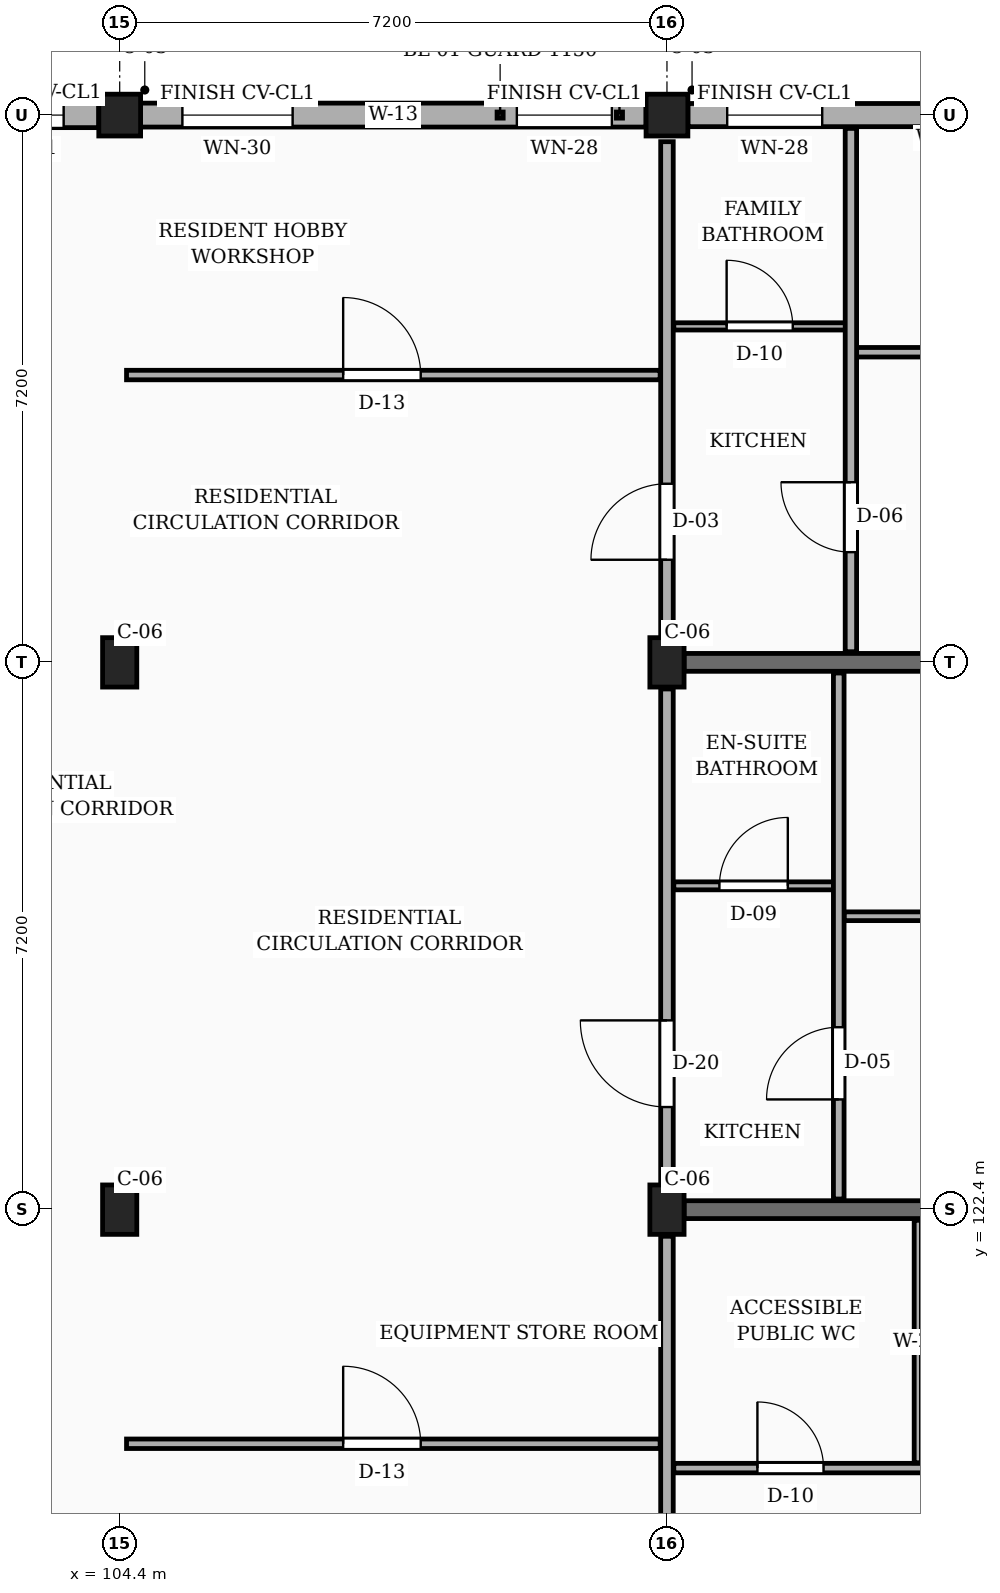
"""IFC4 building model, lengths in metres.
Left out: names, types, materials, properties, quantities, classifications, styles, units other than length and angle.
Written with IfcOpenShell. Run it as: python <this file> out.ifc"""

import sys

from ifc_helpers import new_model, si_unit, direction, frame, frame_2d, origin, origin_2d, place, context, subcontext, project, spatial, rectangle, extrude, element, fill, save


model = new_model("IFC4")
c1 = context("Model", 3, precision=1e-05, world=origin(), true_north=direction((0.0, 1.0)))
c2 = subcontext(c1, "Body", "Model", "MODEL_VIEW")
j1 = project(units=[si_unit("LENGTHUNIT", "METRE"), si_unit("PLANEANGLEUNIT", "RADIAN")], contexts=[c1])
p1 = place(None, origin())
s1 = spatial("IfcSite", under=j1, at=p1, CompositionType="ELEMENT")
p2 = place(p1, origin())
s2 = spatial("IfcBuilding", under=s1, at=p2, CompositionType="ELEMENT")
p3 = place(p2, frame((0.0, 0.0, 20.25)))
s3 = spatial("IfcBuildingStorey", under=s2, at=p3, CompositionType="ELEMENT", Elevation=20.25)
for number, where, z_axis, x_axis in (
    (1, (104.4, 122.4, 0.0), (0.0, 0.0, 1.0), (1.0, 0.0, 0.0)),
    (2, (104.4, 129.6, 0.0), (0.0, 0.0, 1.0), (1.0, 0.0, 0.0)),
):
    element("IfcColumn", number, at=place(p3, frame(where, z_axis=z_axis, x_axis=x_axis)), inside=s3, PredefinedType="COLUMN", context=c2, shape_type="SweptSolid", body=[
        extrude(rectangle(XDim=0.45, YDim=0.65, at=origin_2d()), origin(), (0.0, 0.0, 1.0), 3.15),
    ])
p4 = place(p3, frame((104.4, 136.8, 0.0), z_axis=(0.0, 0.0, 1.0), x_axis=(1.0, 0.0, 0.0)))
e3 = element("IfcColumn", 3, at=p4, inside=s3, PredefinedType="COLUMN", context=c2, shape_type="SweptSolid", body=[
    extrude(rectangle(XDim=0.55, YDim=0.55, at=origin_2d()), origin(), (0.0, 0.0, 1.0), 3.15),
])
for number, where, z_axis, x_axis in (
    (4, (111.6, 122.4, 0.0), (0.0, 0.0, 1.0), (1.0, 0.0, 0.0)),
    (5, (111.6, 129.6, 0.0), (0.0, 0.0, 1.0), (1.0, 0.0, 0.0)),
):
    element("IfcColumn", number, at=place(p3, frame(where, z_axis=z_axis, x_axis=x_axis)), inside=s3, PredefinedType="COLUMN", context=c2, shape_type="SweptSolid", body=[
        extrude(rectangle(XDim=0.45, YDim=0.65, at=origin_2d()), origin(), (0.0, 0.0, 1.0), 3.15),
    ])
p5 = place(p3, frame((111.6, 136.8, 0.0), z_axis=(0.0, 0.0, 1.0), x_axis=(1.0, 0.0, 0.0)))
e6 = element("IfcColumn", 6, at=p5, inside=s3, PredefinedType="COLUMN", context=c2, shape_type="SweptSolid", body=[
    extrude(rectangle(XDim=0.55, YDim=0.55, at=origin_2d()), origin(), (0.0, 0.0, 1.0), 3.15),
])
for number, where, z_axis, x_axis in (
    (7, (111.825, 122.4, 0.0), (0.0, 0.0, 1.0), (1.0, 0.0, 0.0)),
    (8, (111.825, 129.6, 0.0), (0.0, 0.0, 1.0), (1.0, 0.0, 0.0)),
):
    element("IfcWall", number, at=place(p3, frame(where, z_axis=z_axis, x_axis=x_axis)), inside=s3, PredefinedType="SOLIDWALL", context=c2, shape_type="SweptSolid", body=[
        extrude(rectangle(XDim=6.7, YDim=0.235, at=frame_2d((3.35, 0.0))), origin(), (0.0, 0.0, 1.0), 2.19),
    ])
p6 = place(p3, frame((118.525, 136.8, 0.0), z_axis=(0.0, 0.0, 1.0), x_axis=(-1.0, 0.0, 0.0)))
e9 = element("IfcWall", 9, at=p6, inside=s3, PredefinedType="SOLIDWALL", context=c2, shape_type="SweptSolid", body=[
    extrude(rectangle(XDim=6.65, YDim=0.305, at=frame_2d((3.325, 0.0))), origin(), (0.0, 0.0, 1.0), 2.46),
])
p7 = place(p6, frame((1.798, 0.0, 0.78)))
e10 = element("IfcOpeningElement", 10, at=p7, cuts=e9, PredefinedType="OPENING", context=c2, shape_type="SweptSolid", body=[
    extrude(rectangle(XDim=1.05, YDim=1.44, at=frame_2d((0.525, 0.72))), frame((0.0, 0.163, 0.0), z_axis=(0.0, -1.0, 0.0), x_axis=(1.0, 0.0, 0.0)), (0.0, 0.0, 1.0), 0.325),
])
p8 = place(p6, frame((4.883, 0.0, 0.78)))
e11 = element("IfcOpeningElement", 11, at=p8, cuts=e9, PredefinedType="OPENING", context=c2, shape_type="SweptSolid", body=[
    extrude(rectangle(XDim=1.25, YDim=1.44, at=frame_2d((0.625, 0.72))), frame((0.0, 0.163, 0.0), z_axis=(0.0, -1.0, 0.0), x_axis=(1.0, 0.0, 0.0)), (0.0, 0.0, 1.0), 0.325),
])
p9 = place(p3, frame((111.325, 136.8, 0.0), z_axis=(0.0, 0.0, 1.0), x_axis=(-1.0, 0.0, 0.0)))
e12 = element("IfcWall", 12, at=p9, inside=s3, PredefinedType="SOLIDWALL", context=c2, shape_type="SweptSolid", body=[
    extrude(rectangle(XDim=6.65, YDim=0.315, at=frame_2d((3.325, 0.0))), origin(), (0.0, 0.0, 1.0), 2.46),
])
p10 = place(p9, frame((0.45, 0.0, 0.78)))
e13 = element("IfcOpeningElement", 13, at=p10, cuts=e12, PredefinedType="OPENING", context=c2, shape_type="SweptSolid", body=[
    extrude(rectangle(XDim=1.25, YDim=1.44, at=frame_2d((0.625, 0.72))), frame((0.0, 0.167, 0.0), z_axis=(0.0, -1.0, 0.0), x_axis=(1.0, 0.0, 0.0)), (0.0, 0.0, 1.0), 0.335),
])
p11 = place(p9, frame((4.65, 0.0, 0.78)))
e14 = element("IfcOpeningElement", 14, at=p11, cuts=e12, PredefinedType="OPENING", context=c2, shape_type="SweptSolid", body=[
    extrude(rectangle(XDim=1.45, YDim=1.44, at=frame_2d((0.725, 0.72))), frame((0.0, 0.167, 0.0), z_axis=(0.0, -1.0, 0.0), x_axis=(1.0, 0.0, 0.0)), (0.0, 0.0, 1.0), 0.335),
])
p12 = place(p3, frame((104.125, 136.8, 0.0), z_axis=(0.0, 0.0, 1.0), x_axis=(-1.0, 0.0, 0.0)))
e15 = element("IfcWall", 15, at=p12, inside=s3, PredefinedType="SOLIDWALL", context=c2, shape_type="SweptSolid", body=[
    extrude(rectangle(XDim=6.65, YDim=0.33, at=frame_2d((3.325, 0.0))), origin(), (0.0, 0.0, 1.0), 2.46),
])
p13 = place(p12, frame((0.462, 0.0, 0.78)))
e16 = element("IfcOpeningElement", 16, at=p13, cuts=e15, PredefinedType="OPENING", context=c2, shape_type="SweptSolid", body=[
    extrude(rectangle(XDim=1.04, YDim=1.26, at=frame_2d((0.52, 0.63))), frame((0.0, 0.175, 0.0), z_axis=(0.0, -1.0, 0.0), x_axis=(1.0, 0.0, 0.0)), (0.0, 0.0, 1.0), 0.35),
])
p14 = place(p12, frame((3.005, 0.0, 0.78)))
e17 = element("IfcOpeningElement", 17, at=p14, cuts=e15, PredefinedType="OPENING", context=c2, shape_type="SweptSolid", body=[
    extrude(rectangle(XDim=0.92, YDim=1.15, at=frame_2d((0.46, 0.575))), frame((0.0, 0.175, 0.0), z_axis=(0.0, -1.0, 0.0), x_axis=(1.0, 0.0, 0.0)), (0.0, 0.0, 1.0), 0.35),
])
p15 = place(p12, frame((5.383, 0.0, 0.78)))
e18 = element("IfcOpeningElement", 18, at=p15, cuts=e15, PredefinedType="OPENING", context=c2, shape_type="SweptSolid", body=[
    extrude(rectangle(XDim=0.85, YDim=1.15, at=frame_2d((0.425, 0.575))), frame((0.0, 0.175, 0.0), z_axis=(0.0, -1.0, 0.0), x_axis=(1.0, 0.0, 0.0)), (0.0, 0.0, 1.0), 0.35),
])
p16 = place(p3, frame((111.6, 115.55, 0.0), z_axis=(0.0, 0.0, 1.0), x_axis=(0.0, 1.0, 0.0)))
e19 = element("IfcWall", 19, at=p16, inside=s3, PredefinedType="PARTITIONING", context=c2, shape_type="SweptSolid", body=[
    extrude(rectangle(XDim=6.5, YDim=0.165, at=frame_2d((3.25, 0.0))), origin(), (0.0, 0.0, 1.0), 2.325),
])
p17 = place(p16, frame((1.1, 0.0, 0.0)))
e20 = element("IfcOpeningElement", 20, at=p17, cuts=e19, PredefinedType="OPENING", context=c2, shape_type="SweptSolid", body=[
    extrude(rectangle(XDim=0.94, YDim=2.12, at=frame_2d((0.47, 1.06))), frame((0.0, 0.093, 0.0), z_axis=(0.0, -1.0, 0.0), x_axis=(1.0, 0.0, 0.0)), (0.0, 0.0, 1.0), 0.185),
])
p18 = place(p3, frame((111.6, 122.75, 0.0), z_axis=(0.0, 0.0, 1.0), x_axis=(0.0, 1.0, 0.0)))
e21 = element("IfcWall", 21, at=p18, inside=s3, PredefinedType="PARTITIONING", context=c2, shape_type="SweptSolid", body=[
    extrude(rectangle(XDim=6.5, YDim=0.165, at=frame_2d((3.25, 0.0))), origin(), (0.0, 0.0, 1.0), 2.325),
])
p19 = place(p18, frame((1.0, 0.0, 0.0)))
e22 = element("IfcOpeningElement", 22, at=p19, cuts=e21, PredefinedType="OPENING", context=c2, shape_type="SweptSolid", body=[
    extrude(rectangle(XDim=1.14, YDim=2.18, at=frame_2d((0.57, 1.09))), frame((0.0, 0.093, 0.0), z_axis=(0.0, -1.0, 0.0), x_axis=(1.0, 0.0, 0.0)), (0.0, 0.0, 1.0), 0.185),
])
p20 = place(p3, frame((111.6, 129.95, 0.0), z_axis=(0.0, 0.0, 1.0), x_axis=(0.0, 1.0, 0.0)))
e23 = element("IfcWall", 23, at=p20, inside=s3, PredefinedType="PARTITIONING", context=c2, shape_type="SweptSolid", body=[
    extrude(rectangle(XDim=6.5, YDim=0.165, at=frame_2d((3.25, 0.0))), origin(), (0.0, 0.0, 1.0), 2.325),
])
p21 = place(p20, frame((1.0, 0.0, 0.0)))
e24 = element("IfcOpeningElement", 24, at=p21, cuts=e23, PredefinedType="OPENING", context=c2, shape_type="SweptSolid", body=[
    extrude(rectangle(XDim=1.0, YDim=2.15, at=frame_2d((0.5, 1.075))), frame((0.0, 0.093, 0.0), z_axis=(0.0, -1.0, 0.0), x_axis=(1.0, 0.0, 0.0)), (0.0, 0.0, 1.0), 0.185),
])
p22 = place(p3, frame((104.49, 119.32, 0.0), z_axis=(0.0, 0.0, 1.0), x_axis=(1.0, 0.0, 0.0)))
e25 = element("IfcWall", 25, at=p22, inside=s3, PredefinedType="PARTITIONING", context=c2, shape_type="SweptSolid", body=[
    extrude(rectangle(XDim=7.02, YDim=0.125, at=frame_2d((3.51, 0.0))), origin(), (0.0, 0.0, 1.0), 2.325),
])
p23 = place(p22, frame((2.85, 0.0, 0.0)))
e26 = element("IfcOpeningElement", 26, at=p23, cuts=e25, PredefinedType="OPENING", context=c2, shape_type="SweptSolid", body=[
    extrude(rectangle(XDim=1.02, YDim=2.15, at=frame_2d((0.51, 1.075))), frame((0.0, 0.073, 0.0), z_axis=(0.0, -1.0, 0.0), x_axis=(1.0, 0.0, 0.0)), (0.0, 0.0, 1.0), 0.145),
])
p24 = place(p3, frame((111.69, 119.0, 0.0), z_axis=(0.0, 0.0, 1.0), x_axis=(1.0, 0.0, 0.0)))
e27 = element("IfcWall", 27, at=p24, inside=s3, PredefinedType="PARTITIONING", context=c2, shape_type="SweptSolid", body=[
    extrude(rectangle(XDim=6.935, YDim=0.125, at=frame_2d((3.468, 0.0))), origin(), (0.0, 0.0, 1.0), 2.325),
])
p25 = place(p24, frame((1.1, 0.0, 0.0)))
e28 = element("IfcOpeningElement", 28, at=p25, cuts=e27, PredefinedType="OPENING", context=c2, shape_type="SweptSolid", body=[
    extrude(rectangle(XDim=0.87, YDim=2.05, at=frame_2d((0.435, 1.025))), frame((0.0, 0.073, 0.0), z_axis=(0.0, -1.0, 0.0), x_axis=(1.0, 0.0, 0.0)), (0.0, 0.0, 1.0), 0.145),
])
p26 = place(p24, frame((4.5, 0.0, 0.0)))
e29 = element("IfcOpeningElement", 29, at=p26, cuts=e27, PredefinedType="OPENING", context=c2, shape_type="SweptSolid", body=[
    extrude(rectangle(XDim=0.92, YDim=2.1, at=frame_2d((0.46, 1.05))), frame((0.0, 0.073, 0.0), z_axis=(0.0, -1.0, 0.0), x_axis=(1.0, 0.0, 0.0)), (0.0, 0.0, 1.0), 0.145),
])
p27 = place(p3, frame((114.9, 119.07, 0.0), z_axis=(0.0, 0.0, 1.0), x_axis=(0.0, 1.0, 0.0)))
e30 = element("IfcWall", 30, at=p27, inside=s3, PredefinedType="PARTITIONING", context=c2, shape_type="SweptSolid", body=[
    extrude(rectangle(XDim=3.19, YDim=0.095, at=frame_2d((1.595, 0.0))), origin(), (0.0, 0.0, 1.0), 2.325),
])
p28 = place(p3, frame((113.93, 126.26, 0.0), z_axis=(0.0, 0.0, 1.0), x_axis=(1.0, 0.0, 0.0)))
e31 = element("IfcWall", 31, at=p28, inside=s3, PredefinedType="PARTITIONING", context=c2, shape_type="SweptSolid", body=[
    extrude(rectangle(XDim=4.695, YDim=0.115, at=frame_2d((2.348, 0.0))), origin(), (0.0, 0.0, 1.0), 2.325),
])
p29 = place(p28, frame((1.897, 0.0, 0.0)))
e32 = element("IfcOpeningElement", 32, at=p29, cuts=e31, PredefinedType="OPENING", context=c2, shape_type="SweptSolid", body=[
    extrude(rectangle(XDim=0.9, YDim=2.1, at=frame_2d((0.45, 1.05))), frame((0.0, 0.067, 0.0), z_axis=(0.0, -1.0, 0.0), x_axis=(1.0, 0.0, 0.0)), (0.0, 0.0, 1.0), 0.135),
])
p30 = place(p3, frame((111.69, 126.66, 0.0), z_axis=(0.0, 0.0, 1.0), x_axis=(1.0, 0.0, 0.0)))
e33 = element("IfcWall", 33, at=p30, inside=s3, PredefinedType="PARTITIONING", context=c2, shape_type="SweptSolid", body=[
    extrude(rectangle(XDim=2.1, YDim=0.105, at=frame_2d((1.05, 0.0))), origin(), (0.0, 0.0, 1.0), 2.325),
])
p31 = place(p30, frame((0.6, 0.0, 0.0)))
e34 = element("IfcOpeningElement", 34, at=p31, cuts=e33, PredefinedType="OPENING", context=c2, shape_type="SweptSolid", body=[
    extrude(rectangle(XDim=0.9, YDim=2.05, at=frame_2d((0.45, 1.025))), frame((0.0, 0.062, 0.0), z_axis=(0.0, -1.0, 0.0), x_axis=(1.0, 0.0, 0.0)), (0.0, 0.0, 1.0), 0.125),
])
p32 = place(p3, frame((113.86, 122.54, 0.0), z_axis=(0.0, 0.0, 1.0), x_axis=(0.0, 1.0, 0.0)))
e35 = element("IfcWall", 35, at=p32, inside=s3, PredefinedType="PARTITIONING", context=c2, shape_type="SweptSolid", body=[
    extrude(rectangle(XDim=6.92, YDim=0.14, at=frame_2d((3.46, 0.0))), origin(), (0.0, 0.0, 1.0), 2.325),
])
p33 = place(p32, frame((1.31, 0.0, 0.0)))
e36 = element("IfcOpeningElement", 36, at=p33, cuts=e35, PredefinedType="OPENING", context=c2, shape_type="SweptSolid", body=[
    extrude(rectangle(XDim=0.95, YDim=2.1, at=frame_2d((0.475, 1.05))), frame((0.0, 0.08, 0.0), z_axis=(0.0, -1.0, 0.0), x_axis=(1.0, 0.0, 0.0)), (0.0, 0.0, 1.0), 0.16),
])
p34 = place(p3, frame((104.49, 133.38, 0.0), z_axis=(0.0, 0.0, 1.0), x_axis=(1.0, 0.0, 0.0)))
e37 = element("IfcWall", 37, at=p34, inside=s3, PredefinedType="PARTITIONING", context=c2, shape_type="SweptSolid", body=[
    extrude(rectangle(XDim=7.02, YDim=0.125, at=frame_2d((3.51, 0.0))), origin(), (0.0, 0.0, 1.0), 2.325),
])
p35 = place(p34, frame((2.85, 0.0, 0.0)))
e38 = element("IfcOpeningElement", 38, at=p35, cuts=e37, PredefinedType="OPENING", context=c2, shape_type="SweptSolid", body=[
    extrude(rectangle(XDim=1.02, YDim=2.15, at=frame_2d((0.51, 1.075))), frame((0.0, 0.073, 0.0), z_axis=(0.0, -1.0, 0.0), x_axis=(1.0, 0.0, 0.0)), (0.0, 0.0, 1.0), 0.145),
])
p36 = place(p3, frame((114.09, 133.68, 0.0), z_axis=(0.0, 0.0, 1.0), x_axis=(1.0, 0.0, 0.0)))
e39 = element("IfcWall", 39, at=p36, inside=s3, PredefinedType="PARTITIONING", context=c2, shape_type="SweptSolid", body=[
    extrude(rectangle(XDim=4.535, YDim=0.125, at=frame_2d((2.268, 0.0))), origin(), (0.0, 0.0, 1.0), 2.325),
])
p37 = place(p36, frame((1.827, 0.0, 0.0)))
e40 = element("IfcOpeningElement", 40, at=p37, cuts=e39, PredefinedType="OPENING", context=c2, shape_type="SweptSolid", body=[
    extrude(rectangle(XDim=0.88, YDim=2.08, at=frame_2d((0.44, 1.04))), frame((0.0, 0.073, 0.0), z_axis=(0.0, -1.0, 0.0), x_axis=(1.0, 0.0, 0.0)), (0.0, 0.0, 1.0), 0.145),
])
p38 = place(p3, frame((111.69, 134.02, 0.0), z_axis=(0.0, 0.0, 1.0), x_axis=(1.0, 0.0, 0.0)))
e41 = element("IfcWall", 41, at=p38, inside=s3, PredefinedType="PARTITIONING", context=c2, shape_type="SweptSolid", body=[
    extrude(rectangle(XDim=2.26, YDim=0.095, at=frame_2d((1.13, 0.0))), origin(), (0.0, 0.0, 1.0), 2.325),
])
p39 = place(p38, frame((0.695, 0.0, 0.0)))
e42 = element("IfcOpeningElement", 42, at=p39, cuts=e41, PredefinedType="OPENING", context=c2, shape_type="SweptSolid", body=[
    extrude(rectangle(XDim=0.87, YDim=2.05, at=frame_2d((0.435, 1.025))), frame((0.0, 0.058, 0.0), z_axis=(0.0, -1.0, 0.0), x_axis=(1.0, 0.0, 0.0)), (0.0, 0.0, 1.0), 0.115),
])
p40 = place(p3, frame((114.02, 129.74, 0.0), z_axis=(0.0, 0.0, 1.0), x_axis=(0.0, 1.0, 0.0)))
e43 = element("IfcWall", 43, at=p40, inside=s3, PredefinedType="PARTITIONING", context=c2, shape_type="SweptSolid", body=[
    extrude(rectangle(XDim=6.885, YDim=0.15, at=frame_2d((3.442, 0.0))), origin(), (0.0, 0.0, 1.0), 2.325),
])
p41 = place(p40, frame((1.31, 0.0, 0.0)))
e44 = element("IfcOpeningElement", 44, at=p41, cuts=e43, PredefinedType="OPENING", context=c2, shape_type="SweptSolid", body=[
    extrude(rectangle(XDim=0.92, YDim=2.1, at=frame_2d((0.46, 1.05))), frame((0.0, 0.085, 0.0), z_axis=(0.0, -1.0, 0.0), x_axis=(1.0, 0.0, 0.0)), (0.0, 0.0, 1.0), 0.17),
])
p42 = place(p8, origin())
e45 = element("IfcWindow", 45, at=p42, inside=s3, PartitioningType="SINGLE_PANEL", PredefinedType="WINDOW", context=c2, shape_type="SweptSolid", body=[
    extrude(rectangle(XDim=1.25, YDim=1.44, at=frame_2d((0.625, 0.72))), frame((0.0, 0.03, 0.0), z_axis=(0.0, -1.0, 0.0), x_axis=(1.0, 0.0, 0.0)), (0.0, 0.0, 1.0), 0.06),
])
fill(e11, e45)
p43 = place(p10, origin())
e46 = element("IfcWindow", 46, at=p43, inside=s3, PartitioningType="SINGLE_PANEL", PredefinedType="WINDOW", context=c2, shape_type="SweptSolid", body=[
    extrude(rectangle(XDim=1.25, YDim=1.44, at=frame_2d((0.625, 0.72))), frame((0.0, 0.03, 0.0), z_axis=(0.0, -1.0, 0.0), x_axis=(1.0, 0.0, 0.0)), (0.0, 0.0, 1.0), 0.06),
])
fill(e13, e46)
p44 = place(p11, origin())
e47 = element("IfcWindow", 47, at=p44, inside=s3, PartitioningType="SINGLE_PANEL", PredefinedType="WINDOW", context=c2, shape_type="SweptSolid", body=[
    extrude(rectangle(XDim=1.45, YDim=1.44, at=frame_2d((0.725, 0.72))), frame((0.0, 0.03, 0.0), z_axis=(0.0, -1.0, 0.0), x_axis=(1.0, 0.0, 0.0)), (0.0, 0.0, 1.0), 0.06),
])
fill(e14, e47)
p45 = place(p13, origin())
e48 = element("IfcWindow", 48, at=p45, inside=s3, PartitioningType="SINGLE_PANEL", PredefinedType="WINDOW", context=c2, shape_type="SweptSolid", body=[
    extrude(rectangle(XDim=1.04, YDim=1.26, at=frame_2d((0.52, 0.63))), frame((0.0, 0.03, 0.0), z_axis=(0.0, -1.0, 0.0), x_axis=(1.0, 0.0, 0.0)), (0.0, 0.0, 1.0), 0.06),
])
fill(e16, e48)
p46 = place(p19, origin())
e49 = element("IfcDoor", 49, at=p46, inside=s3, OperationType="SINGLE_SWING_RIGHT", PredefinedType="DOOR", context=c2, shape_type="SweptSolid", body=[
    extrude(rectangle(XDim=1.14, YDim=2.18, at=frame_2d((0.57, 1.09))), frame((0.0, 0.025, 0.0), z_axis=(0.0, -1.0, 0.0), x_axis=(1.0, 0.0, 0.0)), (0.0, 0.0, 1.0), 0.05),
])
fill(e22, e49)
p47 = place(p21, origin())
e50 = element("IfcDoor", 50, at=p47, inside=s3, OperationType="SINGLE_SWING_LEFT", PredefinedType="DOOR", context=c2, shape_type="SweptSolid", body=[
    extrude(rectangle(XDim=1.0, YDim=2.15, at=frame_2d((0.5, 1.075))), frame((0.0, 0.025, 0.0), z_axis=(0.0, -1.0, 0.0), x_axis=(1.0, 0.0, 0.0)), (0.0, 0.0, 1.0), 0.05),
])
fill(e24, e50)
p48 = place(p23, origin())
e51 = element("IfcDoor", 51, at=p48, inside=s3, OperationType="SINGLE_SWING_LEFT", PredefinedType="DOOR", context=c2, shape_type="SweptSolid", body=[
    extrude(rectangle(XDim=1.02, YDim=2.15, at=frame_2d((0.51, 1.075))), frame((0.0, 0.025, 0.0), z_axis=(0.0, -1.0, 0.0), x_axis=(1.0, 0.0, 0.0)), (0.0, 0.0, 1.0), 0.05),
])
fill(e26, e51)
p49 = place(p25, origin())
e52 = element("IfcDoor", 52, at=p49, inside=s3, OperationType="SINGLE_SWING_LEFT", PredefinedType="DOOR", context=c2, shape_type="SweptSolid", body=[
    extrude(rectangle(XDim=0.87, YDim=2.05, at=frame_2d((0.435, 1.025))), frame((0.0, 0.025, 0.0), z_axis=(0.0, -1.0, 0.0), x_axis=(1.0, 0.0, 0.0)), (0.0, 0.0, 1.0), 0.05),
])
fill(e28, e52)
p50 = place(p31, origin())
e53 = element("IfcDoor", 53, at=p50, inside=s3, OperationType="SINGLE_SWING_RIGHT", PredefinedType="DOOR", context=c2, shape_type="SweptSolid", body=[
    extrude(rectangle(XDim=0.9, YDim=2.05, at=frame_2d((0.45, 1.025))), frame((0.0, 0.025, 0.0), z_axis=(0.0, -1.0, 0.0), x_axis=(1.0, 0.0, 0.0)), (0.0, 0.0, 1.0), 0.05),
])
fill(e34, e53)
p51 = place(p33, origin())
e54 = element("IfcDoor", 54, at=p51, inside=s3, OperationType="SINGLE_SWING_LEFT", PredefinedType="DOOR", context=c2, shape_type="SweptSolid", body=[
    extrude(rectangle(XDim=0.95, YDim=2.1, at=frame_2d((0.475, 1.05))), frame((0.0, 0.025, 0.0), z_axis=(0.0, -1.0, 0.0), x_axis=(1.0, 0.0, 0.0)), (0.0, 0.0, 1.0), 0.05),
])
fill(e36, e54)
p52 = place(p35, origin())
e55 = element("IfcDoor", 55, at=p52, inside=s3, OperationType="SINGLE_SWING_LEFT", PredefinedType="DOOR", context=c2, shape_type="SweptSolid", body=[
    extrude(rectangle(XDim=1.02, YDim=2.15, at=frame_2d((0.51, 1.075))), frame((0.0, 0.025, 0.0), z_axis=(0.0, -1.0, 0.0), x_axis=(1.0, 0.0, 0.0)), (0.0, 0.0, 1.0), 0.05),
])
fill(e38, e55)
p53 = place(p39, origin())
e56 = element("IfcDoor", 56, at=p53, inside=s3, OperationType="SINGLE_SWING_LEFT", PredefinedType="DOOR", context=c2, shape_type="SweptSolid", body=[
    extrude(rectangle(XDim=0.87, YDim=2.05, at=frame_2d((0.435, 1.025))), frame((0.0, 0.025, 0.0), z_axis=(0.0, -1.0, 0.0), x_axis=(1.0, 0.0, 0.0)), (0.0, 0.0, 1.0), 0.05),
])
fill(e42, e56)
p54 = place(p41, origin())
e57 = element("IfcDoor", 57, at=p54, inside=s3, OperationType="SINGLE_SWING_RIGHT", PredefinedType="DOOR", context=c2, shape_type="SweptSolid", body=[
    extrude(rectangle(XDim=0.92, YDim=2.1, at=frame_2d((0.46, 1.05))), frame((0.0, 0.025, 0.0), z_axis=(0.0, -1.0, 0.0), x_axis=(1.0, 0.0, 0.0)), (0.0, 0.0, 1.0), 0.05),
])
fill(e44, e57)
save(model, sys.argv[1])
